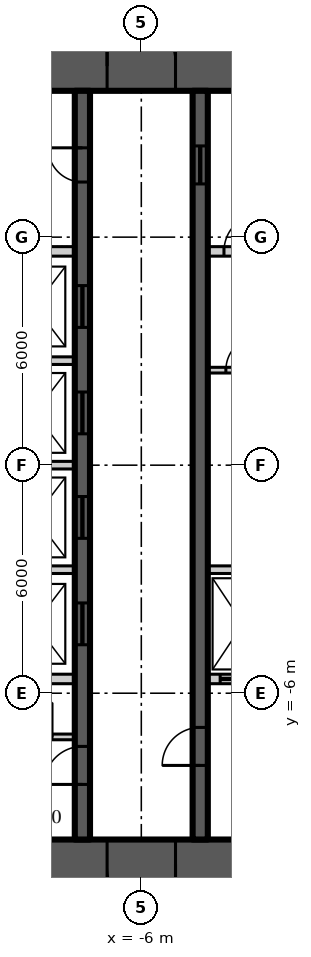
"""IFC4 building model, lengths in metres.
Left out: names, types, materials, properties, quantities, classifications, styles, units other than length and angle.
Written with IfcOpenShell. Run it as: python <this file> out.ifc"""

import sys

from ifc_helpers import new_model, si_unit, direction, frame, frame_2d, origin, place, context, subcontext, project, spatial, rectangle, extrude, element, fill, save


model = new_model("IFC4")
c1 = context("Model", 3, precision=1e-05, world=origin(), true_north=direction((0.0, 1.0)))
c2 = subcontext(c1, "Body", "Model", "MODEL_VIEW")
j1 = project(units=[si_unit("LENGTHUNIT", "METRE"), si_unit("PLANEANGLEUNIT", "RADIAN")], contexts=[c1])
p1 = place(None, origin())
s1 = spatial("IfcSite", under=j1, at=p1, CompositionType="ELEMENT")
p2 = place(p1, origin())
s2 = spatial("IfcBuilding", under=s1, at=p2, CompositionType="ELEMENT")
p3 = place(p2, frame((0.0, 0.0, 102.0)))
s3 = spatial("IfcBuildingStorey", under=s2, at=p3, CompositionType="ELEMENT", Elevation=102.0)
p4 = place(p3, frame((-11.15, 10.5, 0.0), z_axis=(0.0, 0.0, 1.0), x_axis=(1.0, 0.0, 0.0)))
e1 = element("IfcWall", 1, at=p4, inside=s3, PredefinedType="SHEAR", context=c2, shape_type="SweptSolid", body=[
    extrude(rectangle(XDim=22.3, YDim=1.3, at=frame_2d((11.15, 0.0))), origin(), (0.0, 0.0, 1.0), 3.9),
])
p5 = place(p4, frame((4.25, 0.0, 0.0)))
e2 = element("IfcOpeningElement", 2, at=p5, cuts=e1, PredefinedType="OPENING", context=c2, shape_type="SweptSolid", body=[
    extrude(rectangle(XDim=1.8, YDim=2.2, at=frame_2d((0.9, 1.1))), frame((0.0, 0.66, 0.0), z_axis=(0.0, -1.0, 0.0), x_axis=(1.0, 0.0, 0.0)), (0.0, 0.0, 1.0), 1.32),
])
p6 = place(p4, frame((16.25, 0.0, 0.0)))
e3 = element("IfcOpeningElement", 3, at=p6, cuts=e1, PredefinedType="OPENING", context=c2, shape_type="SweptSolid", body=[
    extrude(rectangle(XDim=1.8, YDim=2.2, at=frame_2d((0.9, 1.1))), frame((0.0, 0.66, 0.0), z_axis=(0.0, -1.0, 0.0), x_axis=(1.0, 0.0, 0.0)), (0.0, 0.0, 1.0), 1.32),
])
p7 = place(p3, frame((11.15, -10.5, 0.0), z_axis=(0.0, 0.0, 1.0), x_axis=(-1.0, 0.0, 0.0)))
e4 = element("IfcWall", 4, at=p7, inside=s3, PredefinedType="SHEAR", context=c2, shape_type="SweptSolid", body=[
    extrude(rectangle(XDim=22.3, YDim=1.3, at=frame_2d((11.15, 0.0))), origin(), (0.0, 0.0, 1.0), 3.9),
])
p8 = place(p7, frame((16.25, 0.0, 0.0)))
e5 = element("IfcOpeningElement", 5, at=p8, cuts=e4, PredefinedType="OPENING", context=c2, shape_type="SweptSolid", body=[
    extrude(rectangle(XDim=1.8, YDim=2.2, at=frame_2d((0.9, 1.1))), frame((0.0, 0.66, 0.0), z_axis=(0.0, -1.0, 0.0), x_axis=(1.0, 0.0, 0.0)), (0.0, 0.0, 1.0), 1.32),
])
p9 = place(p7, frame((4.25, 0.0, 0.0)))
e6 = element("IfcOpeningElement", 6, at=p9, cuts=e4, PredefinedType="OPENING", context=c2, shape_type="SweptSolid", body=[
    extrude(rectangle(XDim=1.8, YDim=2.2, at=frame_2d((0.9, 1.1))), frame((0.0, 0.66, 0.0), z_axis=(0.0, -1.0, 0.0), x_axis=(1.0, 0.0, 0.0)), (0.0, 0.0, 1.0), 1.32),
])
p10 = place(p3, frame((-7.55, -9.85, 0.0), z_axis=(0.0, 0.0, 1.0), x_axis=(0.0, 1.0, 0.0)))
e7 = element("IfcWall", 7, at=p10, inside=s3, PredefinedType="SHEAR", context=c2, shape_type="SweptSolid", body=[
    extrude(rectangle(XDim=19.7, YDim=0.4, at=frame_2d((9.85, 0.0))), origin(), (0.0, 0.0, 1.0), 3.9),
])
p11 = place(p10, frame((1.45, 0.0, 0.0)))
e8 = element("IfcOpeningElement", 8, at=p11, cuts=e7, PredefinedType="OPENING", context=c2, shape_type="SweptSolid", body=[
    extrude(rectangle(XDim=1.0, YDim=2.2, at=frame_2d((0.5, 1.1))), frame((0.0, 0.21, 0.0), z_axis=(0.0, -1.0, 0.0), x_axis=(1.0, 0.0, 0.0)), (0.0, 0.0, 1.0), 0.42),
])
p12 = place(p10, frame((17.3, 0.0, 0.0)))
e9 = element("IfcOpeningElement", 9, at=p12, cuts=e7, PredefinedType="OPENING", context=c2, shape_type="SweptSolid", body=[
    extrude(rectangle(XDim=0.9, YDim=2.1, at=frame_2d((0.45, 1.05))), frame((0.0, 0.21, 0.0), z_axis=(0.0, -1.0, 0.0), x_axis=(1.0, 0.0, 0.0)), (0.0, 0.0, 1.0), 0.42),
])
p13 = place(p10, frame((5.125, 0.0, 0.0)))
e10 = element("IfcOpeningElement", 10, at=p13, cuts=e7, PredefinedType="OPENING", context=c2, shape_type="SweptSolid", body=[
    extrude(rectangle(XDim=1.1, YDim=2.2, at=frame_2d((0.55, 1.1))), frame((0.0, 0.21, 0.0), z_axis=(0.0, -1.0, 0.0), x_axis=(1.0, 0.0, 0.0)), (0.0, 0.0, 1.0), 0.42),
])
p14 = place(p10, frame((7.925, 0.0, 0.0)))
e11 = element("IfcOpeningElement", 11, at=p14, cuts=e7, PredefinedType="OPENING", context=c2, shape_type="SweptSolid", body=[
    extrude(rectangle(XDim=1.1, YDim=2.2, at=frame_2d((0.55, 1.1))), frame((0.0, 0.21, 0.0), z_axis=(0.0, -1.0, 0.0), x_axis=(1.0, 0.0, 0.0)), (0.0, 0.0, 1.0), 0.42),
])
p15 = place(p10, frame((10.675, 0.0, 0.0)))
e12 = element("IfcOpeningElement", 12, at=p15, cuts=e7, PredefinedType="OPENING", context=c2, shape_type="SweptSolid", body=[
    extrude(rectangle(XDim=1.1, YDim=2.2, at=frame_2d((0.55, 1.1))), frame((0.0, 0.21, 0.0), z_axis=(0.0, -1.0, 0.0), x_axis=(1.0, 0.0, 0.0)), (0.0, 0.0, 1.0), 0.42),
])
p16 = place(p10, frame((13.475, 0.0, 0.0)))
e13 = element("IfcOpeningElement", 13, at=p16, cuts=e7, PredefinedType="OPENING", context=c2, shape_type="SweptSolid", body=[
    extrude(rectangle(XDim=1.1, YDim=2.2, at=frame_2d((0.55, 1.1))), frame((0.0, 0.21, 0.0), z_axis=(0.0, -1.0, 0.0), x_axis=(1.0, 0.0, 0.0)), (0.0, 0.0, 1.0), 0.42),
])
p17 = place(p3, frame((-4.45, -9.85, 0.0), z_axis=(0.0, 0.0, 1.0), x_axis=(0.0, 1.0, 0.0)))
e14 = element("IfcWall", 14, at=p17, inside=s3, PredefinedType="SHEAR", context=c2, shape_type="SweptSolid", body=[
    extrude(rectangle(XDim=19.7, YDim=0.4, at=frame_2d((9.85, 0.0))), origin(), (0.0, 0.0, 1.0), 3.9),
])
p18 = place(p17, frame((1.95, 0.0, 0.0)))
e15 = element("IfcOpeningElement", 15, at=p18, cuts=e14, PredefinedType="OPENING", context=c2, shape_type="SweptSolid", body=[
    extrude(rectangle(XDim=1.0, YDim=2.2, at=frame_2d((0.5, 1.1))), frame((0.0, 0.21, 0.0), z_axis=(0.0, -1.0, 0.0), x_axis=(1.0, 0.0, 0.0)), (0.0, 0.0, 1.0), 0.42),
])
p19 = place(p17, frame((17.25, 0.0, 0.0)))
e16 = element("IfcOpeningElement", 16, at=p19, cuts=e14, PredefinedType="OPENING", context=c2, shape_type="SweptSolid", body=[
    extrude(rectangle(XDim=1.0, YDim=2.1, at=frame_2d((0.5, 1.05))), frame((0.0, 0.21, 0.0), z_axis=(0.0, -1.0, 0.0), x_axis=(1.0, 0.0, 0.0)), (0.0, 0.0, 1.0), 0.42),
])
p20 = place(p3, frame((-9.85, 5.625, 0.0), z_axis=(0.0, 0.0, 1.0), x_axis=(1.0, 0.0, 0.0)))
e17 = element("IfcWall", 17, at=p20, inside=s3, PredefinedType="SOLIDWALL", context=c2, shape_type="SweptSolid", body=[
    extrude(rectangle(XDim=2.1, YDim=0.25, at=frame_2d((1.05, 0.0))), origin(), (0.0, 0.0, 1.0), 3.7),
])
p21 = place(p3, frame((-4.25, 5.625, 0.0), z_axis=(0.0, 0.0, 1.0), x_axis=(1.0, 0.0, 0.0)))
e18 = element("IfcWall", 18, at=p21, inside=s3, PredefinedType="SOLIDWALL", context=c2, shape_type="SweptSolid", body=[
    extrude(rectangle(XDim=1.85, YDim=0.25, at=frame_2d((0.925, 0.0))), origin(), (0.0, 0.0, 1.0), 3.7),
])
p22 = place(p21, frame((0.425, 0.0, 0.0)))
e19 = element("IfcOpeningElement", 19, at=p22, cuts=e18, PredefinedType="OPENING", context=c2, shape_type="SweptSolid", body=[
    extrude(rectangle(XDim=1.0, YDim=2.2, at=frame_2d((0.5, 1.1))), frame((0.0, 0.135, 0.0), z_axis=(0.0, -1.0, 0.0), x_axis=(1.0, 0.0, 0.0)), (0.0, 0.0, 1.0), 0.27),
])
p23 = place(p3, frame((-9.85, -5.625, 0.0), z_axis=(0.0, 0.0, 1.0), x_axis=(1.0, 0.0, 0.0)))
e20 = element("IfcWall", 20, at=p23, inside=s3, PredefinedType="SOLIDWALL", context=c2, shape_type="SweptSolid", body=[
    extrude(rectangle(XDim=2.1, YDim=0.25, at=frame_2d((1.05, 0.0))), origin(), (0.0, 0.0, 1.0), 3.7),
])
p24 = place(p3, frame((-4.25, -5.625, 0.0), z_axis=(0.0, 0.0, 1.0), x_axis=(1.0, 0.0, 0.0)))
e21 = element("IfcWall", 21, at=p24, inside=s3, PredefinedType="SOLIDWALL", context=c2, shape_type="SweptSolid", body=[
    extrude(rectangle(XDim=1.85, YDim=0.25, at=frame_2d((0.925, 0.0))), origin(), (0.0, 0.0, 1.0), 3.7),
])
p25 = place(p24, frame((0.325, 0.0, 0.0)))
e22 = element("IfcOpeningElement", 22, at=p25, cuts=e21, PredefinedType="OPENING", context=c2, shape_type="SweptSolid", body=[
    extrude(rectangle(XDim=1.2, YDim=2.2, at=frame_2d((0.6, 1.1))), frame((0.0, 0.135, 0.0), z_axis=(0.0, -1.0, 0.0), x_axis=(1.0, 0.0, 0.0)), (0.0, 0.0, 1.0), 0.27),
])
p26 = place(p3, frame((-9.85, -2.75, 0.0), z_axis=(0.0, 0.0, 1.0), x_axis=(1.0, 0.0, 0.0)))
e23 = element("IfcWall", 23, at=p26, inside=s3, PredefinedType="SOLIDWALL", context=c2, shape_type="SweptSolid", body=[
    extrude(rectangle(XDim=2.1, YDim=0.2, at=frame_2d((1.05, 0.0))), origin(), (0.0, 0.0, 1.0), 3.7),
])
p27 = place(p3, frame((-4.25, -2.75, 0.0), z_axis=(0.0, 0.0, 1.0), x_axis=(1.0, 0.0, 0.0)))
e24 = element("IfcWall", 24, at=p27, inside=s3, PredefinedType="SOLIDWALL", context=c2, shape_type="SweptSolid", body=[
    extrude(rectangle(XDim=1.85, YDim=0.2, at=frame_2d((0.925, 0.0))), origin(), (0.0, 0.0, 1.0), 3.7),
])
for number, where, z_axis, x_axis in (
    (25, (-9.85, 0.0, 0.0), (0.0, 0.0, 1.0), (1.0, 0.0, 0.0)),
    (26, (-9.85, 2.75, 0.0), (0.0, 0.0, 1.0), (1.0, 0.0, 0.0)),
):
    element("IfcWall", number, at=place(p3, frame(where, z_axis=z_axis, x_axis=x_axis)), inside=s3, PredefinedType="SOLIDWALL", context=c2, shape_type="SweptSolid", body=[
        extrude(rectangle(XDim=2.1, YDim=0.2, at=frame_2d((1.05, 0.0))), origin(), (0.0, 0.0, 1.0), 3.7),
    ])
p28 = place(p3, frame((-4.25, 2.5, 0.0), z_axis=(0.0, 0.0, 1.0), x_axis=(1.0, 0.0, 0.0)))
e27 = element("IfcWall", 27, at=p28, inside=s3, PredefinedType="SOLIDWALL", context=c2, shape_type="SweptSolid", body=[
    extrude(rectangle(XDim=1.85, YDim=0.15, at=frame_2d((0.925, 0.0))), origin(), (0.0, 0.0, 1.0), 3.77),
])
p29 = place(p28, frame((0.475, 0.0, 0.0)))
e28 = element("IfcOpeningElement", 28, at=p29, cuts=e27, PredefinedType="OPENING", context=c2, shape_type="SweptSolid", body=[
    extrude(rectangle(XDim=0.9, YDim=2.1, at=frame_2d((0.45, 1.05))), frame((0.0, 0.085, 0.0), z_axis=(0.0, -1.0, 0.0), x_axis=(1.0, 0.0, 0.0)), (0.0, 0.0, 1.0), 0.17),
])
p30 = place(p3, frame((-9.85, -7.15, 0.0), z_axis=(0.0, 0.0, 1.0), x_axis=(1.0, 0.0, 0.0)))
e29 = element("IfcWall", 29, at=p30, inside=s3, PredefinedType="SOLIDWALL", context=c2, shape_type="SweptSolid", body=[
    extrude(rectangle(XDim=2.1, YDim=0.15, at=frame_2d((1.05, 0.0))), origin(), (0.0, 0.0, 1.0), 3.77),
])
p31 = place(p30, frame((0.6, 0.0, 0.0)))
e30 = element("IfcOpeningElement", 30, at=p31, cuts=e29, PredefinedType="OPENING", context=c2, shape_type="SweptSolid", body=[
    extrude(rectangle(XDim=0.9, YDim=2.1, at=frame_2d((0.45, 1.05))), frame((0.0, 0.085, 0.0), z_axis=(0.0, -1.0, 0.0), x_axis=(1.0, 0.0, 0.0)), (0.0, 0.0, 1.0), 0.17),
])
p32 = place(p5, origin())
e31 = element("IfcDoor", 31, at=p32, inside=s3, OperationType="DOUBLE_DOOR_DOUBLE_SWING", PredefinedType="DOOR", context=c2, shape_type="SweptSolid", body=[
    extrude(rectangle(XDim=1.8, YDim=2.2, at=frame_2d((0.9, 1.1))), frame((0.0, 0.025, 0.0), z_axis=(0.0, -1.0, 0.0), x_axis=(1.0, 0.0, 0.0)), (0.0, 0.0, 1.0), 0.05),
])
fill(e2, e31)
p33 = place(p8, origin())
e32 = element("IfcDoor", 32, at=p33, inside=s3, OperationType="DOUBLE_DOOR_DOUBLE_SWING", PredefinedType="DOOR", context=c2, shape_type="SweptSolid", body=[
    extrude(rectangle(XDim=1.8, YDim=2.2, at=frame_2d((0.9, 1.1))), frame((0.0, 0.025, 0.0), z_axis=(0.0, -1.0, 0.0), x_axis=(1.0, 0.0, 0.0)), (0.0, 0.0, 1.0), 0.05),
])
fill(e5, e32)
p34 = place(p11, origin())
e33 = element("IfcDoor", 33, at=p34, inside=s3, OperationType="SINGLE_SWING_LEFT", PredefinedType="DOOR", context=c2, shape_type="SweptSolid", body=[
    extrude(rectangle(XDim=1.0, YDim=2.2, at=frame_2d((0.5, 1.1))), frame((0.0, 0.025, 0.0), z_axis=(0.0, -1.0, 0.0), x_axis=(1.0, 0.0, 0.0)), (0.0, 0.0, 1.0), 0.05),
])
fill(e8, e33)
p35 = place(p18, origin())
e34 = element("IfcDoor", 34, at=p35, inside=s3, OperationType="SINGLE_SWING_LEFT", PredefinedType="DOOR", context=c2, shape_type="SweptSolid", body=[
    extrude(rectangle(XDim=1.0, YDim=2.2, at=frame_2d((0.5, 1.1))), frame((0.0, 0.025, 0.0), z_axis=(0.0, -1.0, 0.0), x_axis=(1.0, 0.0, 0.0)), (0.0, 0.0, 1.0), 0.05),
])
fill(e15, e34)
p36 = place(p12, origin())
e35 = element("IfcDoor", 35, at=p36, inside=s3, OperationType="SINGLE_SWING_RIGHT", PredefinedType="DOOR", context=c2, shape_type="SweptSolid", body=[
    extrude(rectangle(XDim=0.9, YDim=2.1, at=frame_2d((0.45, 1.05))), frame((0.0, 0.025, 0.0), z_axis=(0.0, -1.0, 0.0), x_axis=(1.0, 0.0, 0.0)), (0.0, 0.0, 1.0), 0.05),
])
fill(e9, e35)
p37 = place(p19, origin())
e36 = element("IfcDoor", 36, at=p37, inside=s3, OperationType="SLIDING_TO_LEFT", PredefinedType="DOOR", context=c2, shape_type="SweptSolid", body=[
    extrude(rectangle(XDim=1.0, YDim=2.1, at=frame_2d((0.5, 1.05))), frame((0.0, 0.025, 0.0), z_axis=(0.0, -1.0, 0.0), x_axis=(1.0, 0.0, 0.0)), (0.0, 0.0, 1.0), 0.05),
])
fill(e16, e36)
p38 = place(p13, origin())
e37 = element("IfcDoor", 37, at=p38, inside=s3, OperationType="SLIDING_TO_LEFT", PredefinedType="DOOR", context=c2, shape_type="SweptSolid", body=[
    extrude(rectangle(XDim=1.1, YDim=2.2, at=frame_2d((0.55, 1.1))), frame((0.0, 0.025, 0.0), z_axis=(0.0, -1.0, 0.0), x_axis=(1.0, 0.0, 0.0)), (0.0, 0.0, 1.0), 0.05),
])
fill(e10, e37)
p39 = place(p14, origin())
e38 = element("IfcDoor", 38, at=p39, inside=s3, OperationType="SLIDING_TO_LEFT", PredefinedType="DOOR", context=c2, shape_type="SweptSolid", body=[
    extrude(rectangle(XDim=1.1, YDim=2.2, at=frame_2d((0.55, 1.1))), frame((0.0, 0.025, 0.0), z_axis=(0.0, -1.0, 0.0), x_axis=(1.0, 0.0, 0.0)), (0.0, 0.0, 1.0), 0.05),
])
fill(e11, e38)
p40 = place(p15, origin())
e39 = element("IfcDoor", 39, at=p40, inside=s3, OperationType="SLIDING_TO_LEFT", PredefinedType="DOOR", context=c2, shape_type="SweptSolid", body=[
    extrude(rectangle(XDim=1.1, YDim=2.2, at=frame_2d((0.55, 1.1))), frame((0.0, 0.025, 0.0), z_axis=(0.0, -1.0, 0.0), x_axis=(1.0, 0.0, 0.0)), (0.0, 0.0, 1.0), 0.05),
])
fill(e12, e39)
p41 = place(p16, origin())
e40 = element("IfcDoor", 40, at=p41, inside=s3, OperationType="SLIDING_TO_LEFT", PredefinedType="DOOR", context=c2, shape_type="SweptSolid", body=[
    extrude(rectangle(XDim=1.1, YDim=2.2, at=frame_2d((0.55, 1.1))), frame((0.0, 0.025, 0.0), z_axis=(0.0, -1.0, 0.0), x_axis=(1.0, 0.0, 0.0)), (0.0, 0.0, 1.0), 0.05),
])
fill(e13, e40)
p42 = place(p25, origin())
e41 = element("IfcDoor", 41, at=p42, inside=s3, OperationType="SLIDING_TO_LEFT", PredefinedType="DOOR", context=c2, shape_type="SweptSolid", body=[
    extrude(rectangle(XDim=1.2, YDim=2.2, at=frame_2d((0.6, 1.1))), frame((0.0, 0.025, 0.0), z_axis=(0.0, -1.0, 0.0), x_axis=(1.0, 0.0, 0.0)), (0.0, 0.0, 1.0), 0.05),
])
fill(e22, e41)
p43 = place(p29, origin())
e42 = element("IfcDoor", 42, at=p43, inside=s3, OperationType="SINGLE_SWING_RIGHT", PredefinedType="DOOR", context=c2, shape_type="SweptSolid", body=[
    extrude(rectangle(XDim=0.9, YDim=2.1, at=frame_2d((0.45, 1.05))), frame((0.0, 0.025, 0.0), z_axis=(0.0, -1.0, 0.0), x_axis=(1.0, 0.0, 0.0)), (0.0, 0.0, 1.0), 0.05),
])
fill(e28, e42)
p44 = place(p22, origin())
e43 = element("IfcDoor", 43, at=p44, inside=s3, OperationType="SINGLE_SWING_RIGHT", PredefinedType="DOOR", context=c2, shape_type="SweptSolid", body=[
    extrude(rectangle(XDim=1.0, YDim=2.2, at=frame_2d((0.5, 1.1))), frame((0.0, 0.025, 0.0), z_axis=(0.0, -1.0, 0.0), x_axis=(1.0, 0.0, 0.0)), (0.0, 0.0, 1.0), 0.05),
])
fill(e19, e43)
save(model, sys.argv[1])
